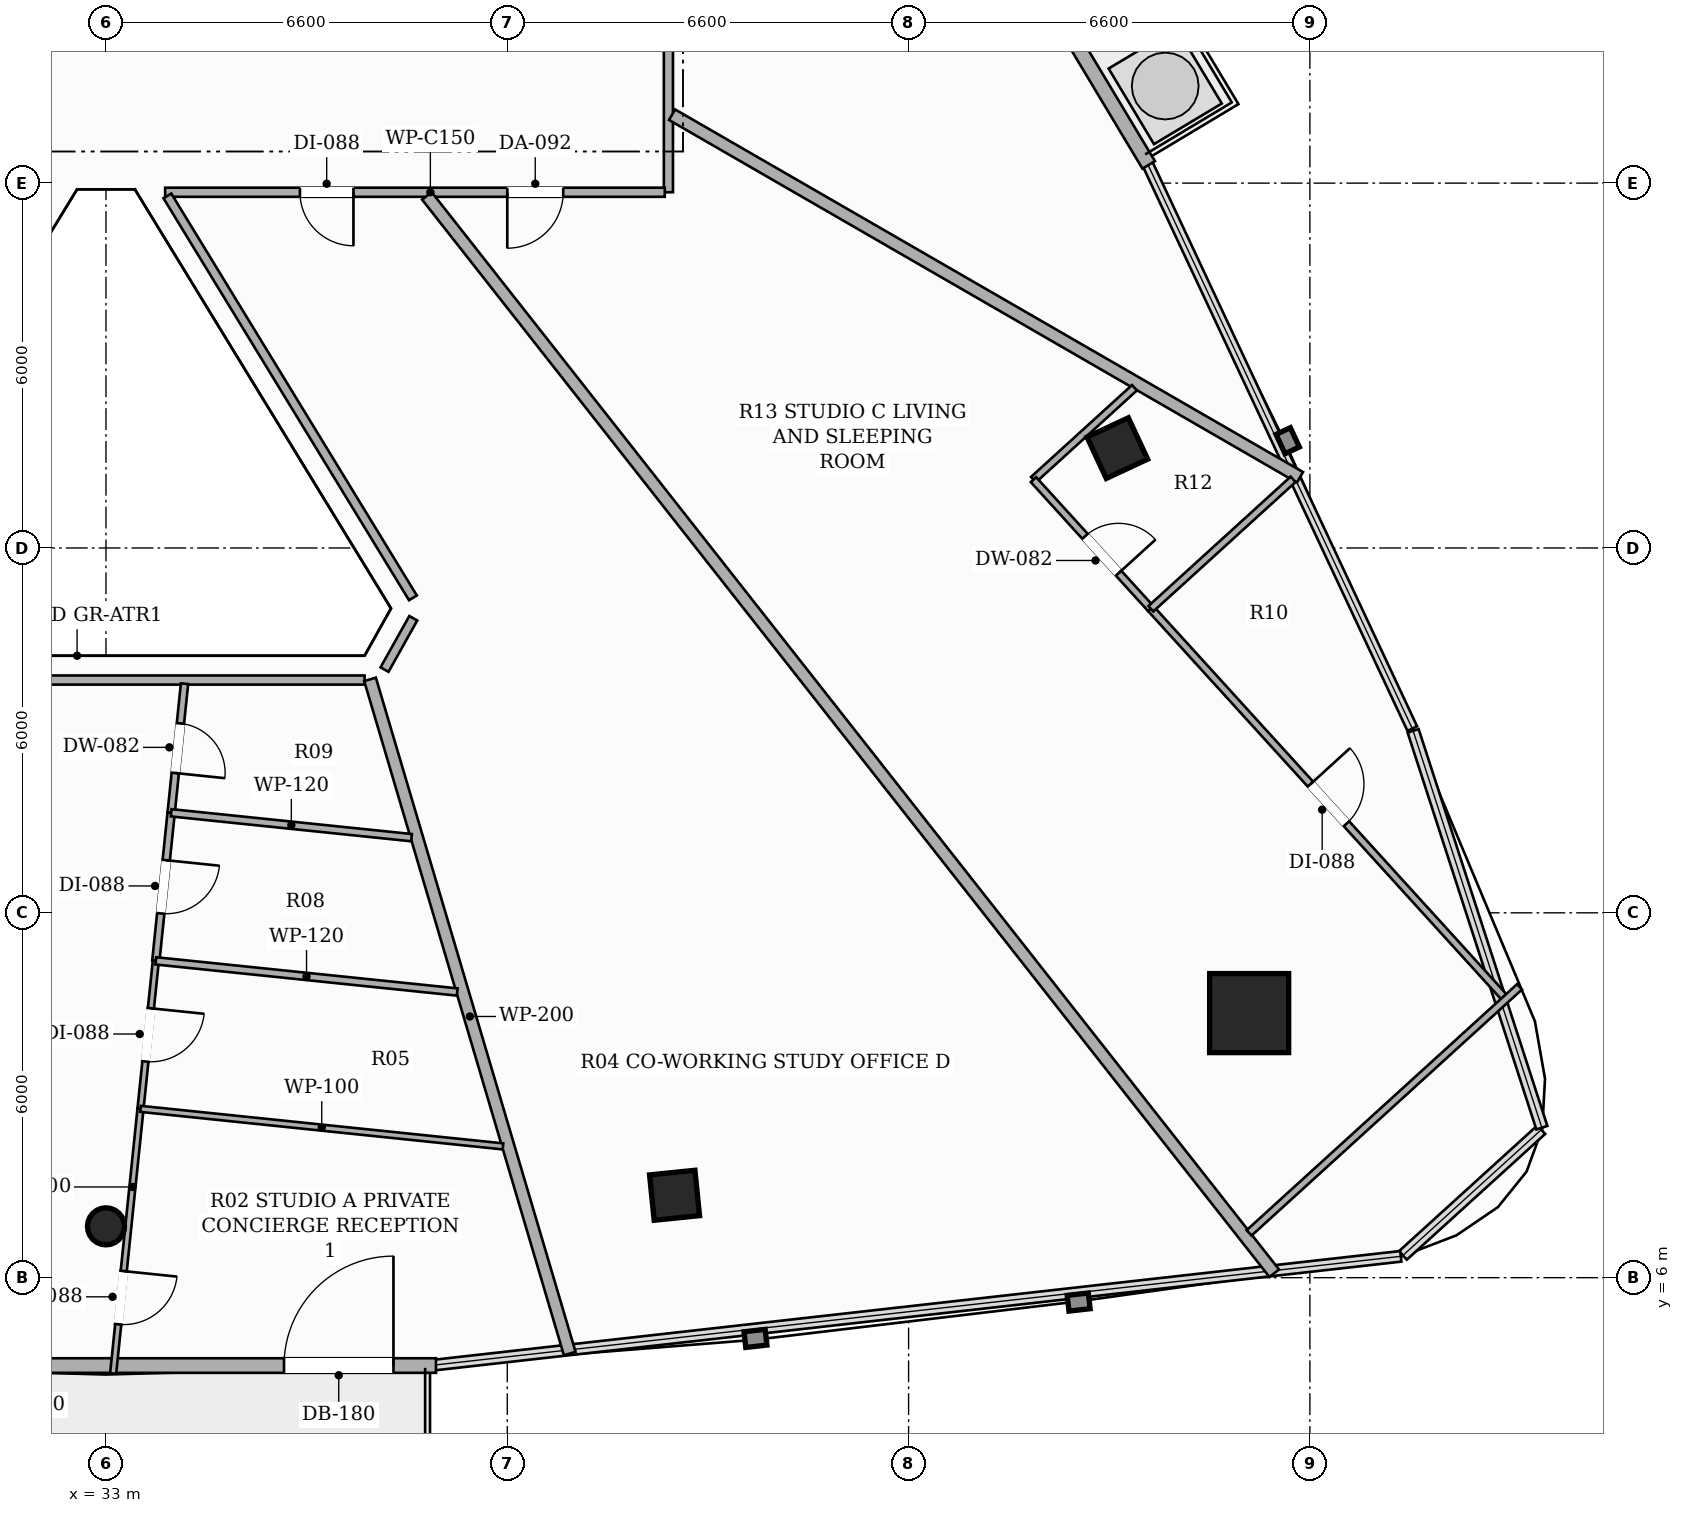
"""IFC4 building model, lengths in metres.
Left out: names, types, materials, properties, quantities, classifications, styles, units other than length and angle.
Written with IfcOpenShell. Run it as: python <this file> out.ifc"""

import sys

from ifc_helpers import new_model, si_unit, direction, frame, frame_2d, origin, origin_2d, place, context, subcontext, project, spatial, rectangle, hollow_rectangle, hollow_circle, extrude, element, fill, save


model = new_model("IFC4")
c1 = context("Model", 3, precision=1e-05, world=origin(), true_north=direction((0.0, 1.0)))
c2 = subcontext(c1, "Body", "Model", "MODEL_VIEW")
j1 = project(units=[si_unit("LENGTHUNIT", "METRE"), si_unit("PLANEANGLEUNIT", "RADIAN")], contexts=[c1])
p1 = place(None, origin())
s1 = spatial("IfcSite", under=j1, at=p1, CompositionType="ELEMENT")
p2 = place(p1, origin())
s2 = spatial("IfcBuilding", under=s1, at=p2, CompositionType="ELEMENT")
p3 = place(p2, frame((0.0, 0.0, 203.0)))
s3 = spatial("IfcBuildingStorey", under=s2, at=p3, CompositionType="ELEMENT", Elevation=203.0)
p4 = place(p3, frame((51.801, 10.351, 0.0), z_axis=(0.0, 0.0, 1.0), x_axis=(1.0, 0.0, 0.0)))
e1 = element("IfcColumn", 1, at=p4, inside=s3, PredefinedType="COLUMN", context=c2, shape_type="SweptSolid", body=[
    extrude(hollow_rectangle(XDim=1.3, YDim=1.3, WallThickness=0.04, at=origin_2d()), origin(), (0.0, 0.0, 1.0), 3.3),
])
p5 = place(p3, frame((33.0, 6.844, 0.0), z_axis=(0.0, 0.0, 1.0), x_axis=(1.0, 0.0, 0.0)))
e2 = element("IfcColumn", 2, at=p5, inside=s3, PredefinedType="COLUMN", context=c2, shape_type="SweptSolid", body=[
    extrude(hollow_circle(Radius=0.305, WallThickness=0.016, at=origin_2d()), origin(), (0.0, 0.0, 1.0), 3.3),
])
for number, where, z_axis, x_axis in (
    (3, (42.351, 7.355, 0.0), (0.0, 0.0, 1.0), (0.995, 0.101, 0.0)),
    (4, (49.633, 19.642, 0.0), (0.0, 0.0, 1.0), (-0.423, 0.906, 0.0)),
):
    element("IfcColumn", number, at=place(p3, frame(where, z_axis=z_axis, x_axis=x_axis)), inside=s3, PredefinedType="COLUMN", context=c2, shape_type="SweptSolid", body=[
        extrude(hollow_rectangle(XDim=0.75, YDim=0.75, WallThickness=0.025, at=origin_2d()), origin(), (0.0, 0.0, 1.0), 3.3),
    ])
p6 = place(p3, frame((27.573, 4.555, 0.0), z_axis=(0.0, 0.0, 1.0), x_axis=(1.0, 0.0, 0.0)))
e5 = element("IfcWall", 5, at=p6, inside=s3, PredefinedType="SOLIDWALL", context=c2, shape_type="SweptSolid", body=[
    extrude(rectangle(XDim=10.854, YDim=0.24, at=frame_2d((5.427, 0.0))), origin(), (0.0, 0.0, 1.0), 2.624),
])
p7 = place(p6, frame((8.355, 0.0, 0.0)))
e6 = element("IfcOpeningElement", 6, at=p7, cuts=e5, PredefinedType="OPENING", context=c2, shape_type="SweptSolid", body=[
    extrude(rectangle(XDim=1.8, YDim=2.2, at=frame_2d((0.9, 1.1))), frame((0.0, 0.13, 0.0), z_axis=(0.0, -1.0, 0.0), x_axis=(1.0, 0.0, 0.0)), (0.0, 0.0, 1.0), 0.26),
])
p8 = place(p3, frame((50.149, 24.3, 0.0), z_axis=(0.0, 0.0, 1.0), x_axis=(-0.514406779101, 0.857546305231, 0.0)))
e7 = element("IfcWall", 7, at=p8, inside=s3, PredefinedType="SOLIDWALL", context=c2, shape_type="SweptSolid", body=[
    extrude(rectangle(XDim=10.492, YDim=0.24, at=frame_2d((5.246, 0.0))), origin(), (0.0, 0.0, 1.0), 2.624),
])
p9 = place(p8, frame((7.994, 0.0, 0.0)))
e8 = element("IfcOpeningElement", 8, at=p9, cuts=e7, PredefinedType="OPENING", context=c2, shape_type="SweptSolid", body=[
    extrude(rectangle(XDim=1.8, YDim=2.2, at=frame_2d((0.9, 1.1))), frame((0.0, 0.13, 0.0), z_axis=(0.0, -1.0, 0.0), x_axis=(1.0, 0.0, 0.0)), (0.0, 0.0, 1.0), 0.26),
])
p10 = place(p3, frame((42.25, 26.59, 0.0), z_axis=(0.0, 0.0, 1.0), x_axis=(0.0, -1.0, 0.0)))
e9 = element("IfcWall", 9, at=p10, inside=s3, PredefinedType="PARTITIONING", context=c2, shape_type="SweptSolid", body=[
    extrude(rectangle(XDim=2.74, YDim=0.15, at=frame_2d((1.37, 0.0))), origin(), (0.0, 0.0, 1.0), 2.773),
])
p11 = place(p3, frame((42.19, 23.85, 0.0), z_axis=(0.0, 0.0, 1.0), x_axis=(-1.0, 0.0, 0.0)))
e10 = element("IfcWall", 10, at=p11, inside=s3, PredefinedType="PARTITIONING", context=c2, shape_type="SweptSolid", body=[
    extrude(rectangle(XDim=8.217, YDim=0.15, at=frame_2d((4.108, 0.0))), origin(), (0.0, 0.0, 1.0), 2.565),
])
p12 = place(p11, frame((1.67, 0.0, 0.0)))
e11 = element("IfcOpeningElement", 11, at=p12, cuts=e10, PredefinedType="OPENING", context=c2, shape_type="SweptSolid", body=[
    extrude(rectangle(XDim=0.92, YDim=2.15, at=frame_2d((0.46, 1.075))), frame((0.0, 0.085, 0.0), z_axis=(0.0, -1.0, 0.0), x_axis=(1.0, 0.0, 0.0)), (0.0, 0.0, 1.0), 0.17),
])
p13 = place(p11, frame((5.12, 0.0, 0.0)))
e12 = element("IfcOpeningElement", 12, at=p13, cuts=e10, PredefinedType="OPENING", context=c2, shape_type="SweptSolid", body=[
    extrude(rectangle(XDim=0.88, YDim=2.1, at=frame_2d((0.44, 1.05))), frame((0.0, 0.085, 0.0), z_axis=(0.0, -1.0, 0.0), x_axis=(1.0, 0.0, 0.0)), (0.0, 0.0, 1.0), 0.17),
])
p14 = place(p3, frame((34.01, 23.79, 0.0), z_axis=(0.0, 0.0, 1.0), x_axis=(0.521316137909, -0.853363629618, 0.0)))
e13 = element("IfcWall", 13, at=p14, inside=s3, PredefinedType="PARTITIONING", context=c2, shape_type="SweptSolid", body=[
    extrude(rectangle(XDim=7.746, YDim=0.15, at=frame_2d((3.873, 0.0))), origin(), (0.0, 0.0, 1.0), 2.773),
])
p15 = place(p3, frame((38.054, 16.844, 0.0), z_axis=(0.0, 0.0, 1.0), x_axis=(-0.488810833005, -0.872389803664, 0.0)))
e14 = element("IfcWall", 14, at=p15, inside=s3, PredefinedType="PARTITIONING", context=c2, shape_type="SweptSolid", body=[
    extrude(rectangle(XDim=0.968, YDim=0.15, at=frame_2d((0.484, 0.0))), origin(), (0.0, 0.0, 1.0), 3.06),
])
p16 = place(p3, frame((37.253, 15.828, 0.0), z_axis=(0.0, 0.0, 1.0), x_axis=(-1.0, 0.0, 0.0)))
e15 = element("IfcWall", 15, at=p16, inside=s3, PredefinedType="PARTITIONING", context=c2, shape_type="SweptSolid", body=[
    extrude(rectangle(XDim=8.506, YDim=0.15, at=frame_2d((4.253, 0.0))), origin(), (0.0, 0.0, 1.0), 2.773),
])
p17 = place(p3, frame((37.343, 15.839, 0.0), z_axis=(0.0, 0.0, 1.0), x_axis=(0.28399703203, -0.958825159139, 0.0)))
e16 = element("IfcWall", 16, at=p17, inside=s3, PredefinedType="PARTITIONING", context=c2, shape_type="SweptSolid", body=[
    extrude(rectangle(XDim=11.563, YDim=0.2, at=frame_2d((5.782, 0.0))), origin(), (0.0, 0.0, 1.0), 2.492),
])
p18 = place(p3, frame((52.214, 6.073, 0.0), z_axis=(0.0, 0.0, 1.0), x_axis=(-0.618246700658, 0.785984107425, 0.0)))
e17 = element("IfcWall", 17, at=p18, inside=s3, PredefinedType="PARTITIONING", context=c2, shape_type="SweptSolid", body=[
    extrude(rectangle(XDim=22.541, YDim=0.2, at=frame_2d((11.271, 0.0))), origin(), (0.0, 0.0, 1.0), 2.492),
])
p19 = place(p3, frame((42.31, 25.125, 0.0), z_axis=(0.0, 0.0, 1.0), x_axis=(0.866001812803, -0.500040858552, 0.0)))
e18 = element("IfcWall", 18, at=p19, inside=s3, PredefinedType="PARTITIONING", context=c2, shape_type="SweptSolid", body=[
    extrude(rectangle(XDim=11.925, YDim=0.2, at=frame_2d((5.962, 0.0))), origin(), (0.0, 0.0, 1.0), 2.492),
])
p20 = place(p3, frame((34.292, 15.768, 0.0), z_axis=(0.0, 0.0, 1.0), x_axis=(-0.103059151492, -0.994675229054, 0.0)))
e19 = element("IfcWall", 19, at=p20, inside=s3, PredefinedType="PARTITIONING", context=c2, shape_type="SweptSolid", body=[
    extrude(rectangle(XDim=2.135, YDim=0.12, at=frame_2d((1.067, 0.0))), origin(), (0.0, 0.0, 1.0), 3.06),
])
p21 = place(p20, frame((0.657, 0.0, 0.0)))
e20 = element("IfcOpeningElement", 20, at=p21, cuts=e19, PredefinedType="OPENING", context=c2, shape_type="SweptSolid", body=[
    extrude(rectangle(XDim=0.82, YDim=2.1, at=frame_2d((0.41, 1.05))), frame((0.0, 0.07, 0.0), z_axis=(0.0, -1.0, 0.0), x_axis=(1.0, 0.0, 0.0)), (0.0, 0.0, 1.0), 0.14),
])
p22 = place(p3, frame((34.072, 13.645, 0.0), z_axis=(0.0, 0.0, 1.0), x_axis=(-0.102919566026, -0.994689681724, 0.0)))
e21 = element("IfcWall", 21, at=p22, inside=s3, PredefinedType="PARTITIONING", context=c2, shape_type="SweptSolid", body=[
    extrude(rectangle(XDim=2.448, YDim=0.12, at=frame_2d((1.224, 0.0))), origin(), (0.0, 0.0, 1.0), 3.06),
])
p23 = place(p22, frame((0.784, 0.0, 0.0)))
e22 = element("IfcOpeningElement", 22, at=p23, cuts=e21, PredefinedType="OPENING", context=c2, shape_type="SweptSolid", body=[
    extrude(rectangle(XDim=0.88, YDim=2.1, at=frame_2d((0.44, 1.05))), frame((0.0, 0.07, 0.0), z_axis=(0.0, -1.0, 0.0), x_axis=(1.0, 0.0, 0.0)), (0.0, 0.0, 1.0), 0.14),
])
p24 = place(p3, frame((33.568, 8.776, 0.0), z_axis=(0.0, 0.0, 1.0), x_axis=(-0.1029239069, -0.994689232569, 0.0)))
e23 = element("IfcWall", 23, at=p24, inside=s3, PredefinedType="PARTITIONING", context=c2, shape_type="SweptSolid", body=[
    extrude(rectangle(XDim=4.374, YDim=0.1, at=frame_2d((2.187, 0.0))), origin(), (0.0, 0.0, 1.0), 2.492),
])
p25 = place(p24, frame((2.682, 0.0, 0.0)))
e24 = element("IfcOpeningElement", 24, at=p25, cuts=e23, PredefinedType="OPENING", context=c2, shape_type="SweptSolid", body=[
    extrude(rectangle(XDim=0.88, YDim=2.1, at=frame_2d((0.44, 1.05))), frame((0.0, 0.06, 0.0), z_axis=(0.0, -1.0, 0.0), x_axis=(1.0, 0.0, 0.0)), (0.0, 0.0, 1.0), 0.12),
])
p26 = place(p3, frame((33.82, 11.21, 0.0), z_axis=(0.0, 0.0, 1.0), x_axis=(-0.102960420087, -0.994685453747, 0.0)))
e25 = element("IfcWall", 25, at=p26, inside=s3, PredefinedType="PARTITIONING", context=c2, shape_type="SweptSolid", body=[
    extrude(rectangle(XDim=2.447, YDim=0.1, at=frame_2d((1.224, 0.0))), origin(), (0.0, 0.0, 1.0), 3.06),
])
p27 = place(p26, frame((0.784, 0.0, 0.0)))
e26 = element("IfcOpeningElement", 26, at=p27, cuts=e25, PredefinedType="OPENING", context=c2, shape_type="SweptSolid", body=[
    extrude(rectangle(XDim=0.88, YDim=2.1, at=frame_2d((0.44, 1.05))), frame((0.0, 0.06, 0.0), z_axis=(0.0, -1.0, 0.0), x_axis=(1.0, 0.0, 0.0)), (0.0, 0.0, 1.0), 0.12),
])
p28 = place(p3, frame((38.025, 13.236, 0.0), z_axis=(0.0, 0.0, 1.0), x_axis=(-0.99469136016, 0.102903343108, 0.0)))
e27 = element("IfcWall", 27, at=p28, inside=s3, PredefinedType="PARTITIONING", context=c2, shape_type="SweptSolid", body=[
    extrude(rectangle(XDim=3.974, YDim=0.12, at=frame_2d((1.987, 0.0))), origin(), (0.0, 0.0, 1.0), 2.773),
])
p29 = place(p3, frame((38.777, 10.698, 0.0), z_axis=(0.0, 0.0, 1.0), x_axis=(-0.994708898019, 0.102733676081, 0.0)))
e28 = element("IfcWall", 28, at=p29, inside=s3, PredefinedType="PARTITIONING", context=c2, shape_type="SweptSolid", body=[
    extrude(rectangle(XDim=4.983, YDim=0.12, at=frame_2d((2.492, 0.0))), origin(), (0.0, 0.0, 1.0), 2.773),
])
p30 = place(p3, frame((33.568, 8.776, 0.0), z_axis=(0.0, 0.0, 1.0), x_axis=(0.994686760155, -0.102947798284, 0.0)))
e29 = element("IfcWall", 29, at=p30, inside=s3, PredefinedType="PARTITIONING", context=c2, shape_type="SweptSolid", body=[
    extrude(rectangle(XDim=5.993, YDim=0.1, at=frame_2d((2.996, 0.0))), origin(), (0.0, 0.0, 1.0), 2.773),
])
p31 = place(p3, frame((49.915, 20.635, 0.0), z_axis=(0.0, 0.0, 1.0), x_axis=(-0.739748179987, -0.672883816276, 0.0)))
e30 = element("IfcWall", 30, at=p31, inside=s3, PredefinedType="PARTITIONING", context=c2, shape_type="SweptSolid", body=[
    extrude(rectangle(XDim=2.246, YDim=0.12, at=frame_2d((1.123, 0.0))), origin(), (0.0, 0.0, 1.0), 2.492),
])
p32 = place(p3, frame((48.254, 19.124, 0.0), z_axis=(0.0, 0.0, 1.0), x_axis=(0.672884473084, -0.739747582546, 0.0)))
e31 = element("IfcWall", 31, at=p32, inside=s3, PredefinedType="PARTITIONING", context=c2, shape_type="SweptSolid", body=[
    extrude(rectangle(XDim=2.87, YDim=0.12, at=frame_2d((1.435, 0.0))), origin(), (0.0, 0.0, 1.0), 2.492),
])
p33 = place(p32, frame((1.26, 0.0, 0.0)))
e32 = element("IfcOpeningElement", 32, at=p33, cuts=e31, PredefinedType="OPENING", context=c2, shape_type="SweptSolid", body=[
    extrude(rectangle(XDim=0.82, YDim=2.1, at=frame_2d((0.41, 1.05))), frame((0.0, 0.07, 0.0), z_axis=(0.0, -1.0, 0.0), x_axis=(1.0, 0.0, 0.0)), (0.0, 0.0, 1.0), 0.14),
])
p34 = place(p3, frame((50.185, 17.001, 0.0), z_axis=(0.0, 0.0, 1.0), x_axis=(0.672902356661, -0.739731315005, 0.0)))
e33 = element("IfcWall", 33, at=p34, inside=s3, PredefinedType="PARTITIONING", context=c2, shape_type="SweptSolid", body=[
    extrude(rectangle(XDim=8.68, YDim=0.12, at=frame_2d((4.34, 0.0))), origin(), (0.0, 0.0, 1.0), 2.492),
])
p35 = place(p34, frame((3.9, 0.0, 0.0)))
e34 = element("IfcOpeningElement", 34, at=p35, cuts=e33, PredefinedType="OPENING", context=c2, shape_type="SweptSolid", body=[
    extrude(rectangle(XDim=0.88, YDim=2.1, at=frame_2d((0.44, 1.05))), frame((0.0, 0.07, 0.0), z_axis=(0.0, -1.0, 0.0), x_axis=(1.0, 0.0, 0.0)), (0.0, 0.0, 1.0), 0.14),
])
p36 = place(p3, frame((56.248, 10.783, 0.0), z_axis=(0.0, 0.0, 1.0), x_axis=(-0.739671804489, -0.672967771624, 0.0)))
e35 = element("IfcWall", 35, at=p36, inside=s3, PredefinedType="PARTITIONING", context=c2, shape_type="SweptSolid", body=[
    extrude(rectangle(XDim=6.013, YDim=0.12, at=frame_2d((3.007, 0.0))), origin(), (0.0, 0.0, 1.0), 3.06),
])
p37 = place(p3, frame((52.524, 19.129, 0.0), z_axis=(0.0, 0.0, 1.0), x_axis=(-0.739674496232, -0.672964813065, 0.0)))
e36 = element("IfcWall", 36, at=p37, inside=s3, PredefinedType="PARTITIONING", context=c2, shape_type="SweptSolid", body=[
    extrude(rectangle(XDim=3.162, YDim=0.12, at=frame_2d((1.581, 0.0))), origin(), (0.0, 0.0, 1.0), 2.492),
])
p38 = place(p7, origin())
e37 = element("IfcDoor", 37, at=p38, inside=s3, OperationType="SINGLE_SWING_RIGHT", PredefinedType="DOOR", context=c2, shape_type="SweptSolid", body=[
    extrude(rectangle(XDim=1.8, YDim=2.2, at=frame_2d((0.9, 1.1))), frame((0.0, 0.025, 0.0), z_axis=(0.0, -1.0, 0.0), x_axis=(1.0, 0.0, 0.0)), (0.0, 0.0, 1.0), 0.05),
])
fill(e6, e37)
p39 = place(p21, origin())
e38 = element("IfcDoor", 38, at=p39, inside=s3, OperationType="SINGLE_SWING_RIGHT", PredefinedType="DOOR", context=c2, shape_type="SweptSolid", body=[
    extrude(rectangle(XDim=0.82, YDim=2.1, at=frame_2d((0.41, 1.05))), frame((0.0, 0.025, 0.0), z_axis=(0.0, -1.0, 0.0), x_axis=(1.0, 0.0, 0.0)), (0.0, 0.0, 1.0), 0.05),
])
fill(e20, e38)
p40 = place(p23, origin())
e39 = element("IfcDoor", 39, at=p40, inside=s3, OperationType="SINGLE_SWING_LEFT", PredefinedType="DOOR", context=c2, shape_type="SweptSolid", body=[
    extrude(rectangle(XDim=0.88, YDim=2.1, at=frame_2d((0.44, 1.05))), frame((0.0, 0.025, 0.0), z_axis=(0.0, -1.0, 0.0), x_axis=(1.0, 0.0, 0.0)), (0.0, 0.0, 1.0), 0.05),
])
fill(e22, e39)
p41 = place(p25, origin())
e40 = element("IfcDoor", 40, at=p41, inside=s3, OperationType="SINGLE_SWING_LEFT", PredefinedType="DOOR", context=c2, shape_type="SweptSolid", body=[
    extrude(rectangle(XDim=0.88, YDim=2.1, at=frame_2d((0.44, 1.05))), frame((0.0, 0.025, 0.0), z_axis=(0.0, -1.0, 0.0), x_axis=(1.0, 0.0, 0.0)), (0.0, 0.0, 1.0), 0.05),
])
fill(e24, e40)
p42 = place(p27, origin())
e41 = element("IfcDoor", 41, at=p42, inside=s3, OperationType="SINGLE_SWING_LEFT", PredefinedType="DOOR", context=c2, shape_type="SweptSolid", body=[
    extrude(rectangle(XDim=0.88, YDim=2.1, at=frame_2d((0.44, 1.05))), frame((0.0, 0.025, 0.0), z_axis=(0.0, -1.0, 0.0), x_axis=(1.0, 0.0, 0.0)), (0.0, 0.0, 1.0), 0.05),
])
fill(e26, e41)
p43 = place(p12, origin())
e42 = element("IfcDoor", 42, at=p43, inside=s3, OperationType="SINGLE_SWING_RIGHT", PredefinedType="DOOR", context=c2, shape_type="SweptSolid", body=[
    extrude(rectangle(XDim=0.92, YDim=2.15, at=frame_2d((0.46, 1.075))), frame((0.0, 0.025, 0.0), z_axis=(0.0, -1.0, 0.0), x_axis=(1.0, 0.0, 0.0)), (0.0, 0.0, 1.0), 0.05),
])
fill(e11, e42)
p44 = place(p33, origin())
e43 = element("IfcDoor", 43, at=p44, inside=s3, OperationType="SINGLE_SWING_RIGHT", PredefinedType="DOOR", context=c2, shape_type="SweptSolid", body=[
    extrude(rectangle(XDim=0.82, YDim=2.1, at=frame_2d((0.41, 1.05))), frame((0.0, 0.025, 0.0), z_axis=(0.0, -1.0, 0.0), x_axis=(1.0, 0.0, 0.0)), (0.0, 0.0, 1.0), 0.05),
])
fill(e32, e43)
p45 = place(p35, origin())
e44 = element("IfcDoor", 44, at=p45, inside=s3, OperationType="SINGLE_SWING_LEFT", PredefinedType="DOOR", context=c2, shape_type="SweptSolid", body=[
    extrude(rectangle(XDim=0.88, YDim=2.1, at=frame_2d((0.44, 1.05))), frame((0.0, 0.025, 0.0), z_axis=(0.0, -1.0, 0.0), x_axis=(1.0, 0.0, 0.0)), (0.0, 0.0, 1.0), 0.05),
])
fill(e34, e44)
p46 = place(p13, origin())
e45 = element("IfcDoor", 45, at=p46, inside=s3, OperationType="SINGLE_SWING_LEFT", PredefinedType="DOOR", context=c2, shape_type="SweptSolid", body=[
    extrude(rectangle(XDim=0.88, YDim=2.1, at=frame_2d((0.44, 1.05))), frame((0.0, 0.025, 0.0), z_axis=(0.0, -1.0, 0.0), x_axis=(1.0, 0.0, 0.0)), (0.0, 0.0, 1.0), 0.05),
])
fill(e12, e45)
save(model, sys.argv[1])
